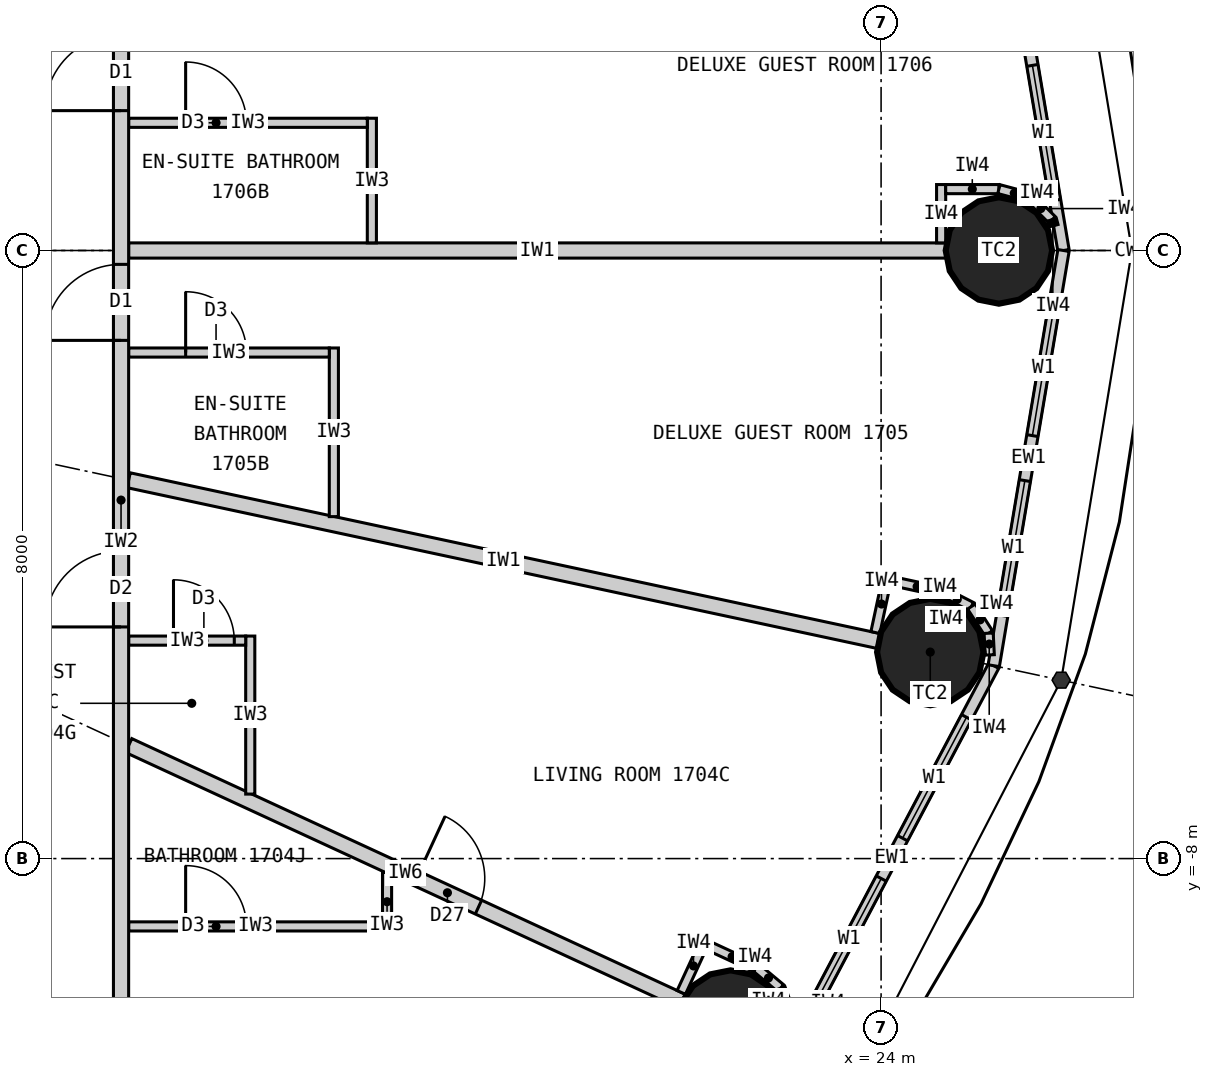
"""IFC4 building model, lengths in metres.
Left out: names, types, materials, properties, quantities, classifications, styles, units other than length and angle.
Written with IfcOpenShell. Run it as: python <this file> out.ifc"""

import sys

from ifc_helpers import new_model, si_unit, direction, frame, frame_2d, origin, origin_2d, place, context, subcontext, project, spatial, rectangle, circle, extrude, element, fill, save


model = new_model("IFC4")
c1 = context("Model", 3, precision=1e-05, world=origin(), true_north=direction((0.0, 1.0)))
c2 = subcontext(c1, "Body", "Model", "MODEL_VIEW")
j1 = project(units=[si_unit("LENGTHUNIT", "METRE"), si_unit("PLANEANGLEUNIT", "RADIAN")], contexts=[c1])
p1 = place(None, origin())
s1 = spatial("IfcSite", under=j1, at=p1, CompositionType="ELEMENT")
p2 = place(p1, origin())
s2 = spatial("IfcBuilding", under=s1, at=p2, CompositionType="ELEMENT")
p3 = place(p2, frame((0.0, 0.0, 70.5)))
s3 = spatial("IfcBuildingStorey", under=s2, at=p3, CompositionType="ELEMENT", Elevation=70.5)
for number, where, z_axis, x_axis in (
    (1, (25.55, 0.0, 0.0), (0.0, 0.0, 1.0), (1.0, 0.0, 0.0)),
    (2, (22.019, -10.17, 0.0), (0.0, 0.0, 1.0), (1.0, 0.0, 0.0)),
    (3, (24.647, -5.283, 0.0), (0.0, 0.0, 1.0), (1.0, 0.0, 0.0)),
):
    element("IfcColumn", number, at=place(p3, frame(where, z_axis=z_axis, x_axis=x_axis)), inside=s3, PredefinedType="COLUMN", context=c2, shape_type="SweptSolid", body=[
        extrude(circle(Radius=0.7, at=origin_2d()), origin(), (0.0, 0.0, 1.0), 3.3),
    ])
p4 = place(p3, frame((26.4, 0.0, 0.0), z_axis=(0.0, 0.0, 1.0), x_axis=(-0.165642551694, 0.986185857264, 0.0)))
e4 = element("IfcWall", 4, at=p4, inside=s3, PredefinedType="ELEMENTEDWALL", context=c2, shape_type="SweptSolid", body=[
    extrude(rectangle(XDim=5.539, YDim=0.15, at=frame_2d((2.77, 0.0))), origin(), (0.0, 0.0, 1.0), 3.12),
])
p5 = place(p4, frame((0.669, 0.0, 0.9)))
e5 = element("IfcOpeningElement", 5, at=p5, cuts=e4, PredefinedType="OPENING", context=c2, shape_type="SweptSolid", body=[
    extrude(rectangle(XDim=1.8, YDim=1.9, at=frame_2d((0.9, 0.95))), frame((0.0, 0.085, 0.0), z_axis=(0.0, -1.0, 0.0), x_axis=(1.0, 0.0, 0.0)), (0.0, 0.0, 1.0), 0.17),
])
p6 = place(p4, frame((3.07, 0.0, 0.9)))
e6 = element("IfcOpeningElement", 6, at=p6, cuts=e4, PredefinedType="OPENING", context=c2, shape_type="SweptSolid", body=[
    extrude(rectangle(XDim=1.8, YDim=1.9, at=frame_2d((0.9, 0.95))), frame((0.0, 0.085, 0.0), z_axis=(0.0, -1.0, 0.0), x_axis=(1.0, 0.0, 0.0)), (0.0, 0.0, 1.0), 0.17),
])
p7 = place(p3, frame((22.803, -10.532, 0.0), z_axis=(0.0, 0.0, 1.0), x_axis=(0.467296867008, 0.884100468321, 0.0)))
e7 = element("IfcWall", 7, at=p7, inside=s3, PredefinedType="ELEMENTEDWALL", context=c2, shape_type="SweptSolid", body=[
    extrude(rectangle(XDim=5.734, YDim=0.15, at=frame_2d((2.867, 0.0))), origin(), (0.0, 0.0, 1.0), 3.12),
])
p8 = place(p7, frame((0.767, 0.0, 0.9)))
e8 = element("IfcOpeningElement", 8, at=p8, cuts=e7, PredefinedType="OPENING", context=c2, shape_type="SweptSolid", body=[
    extrude(rectangle(XDim=1.8, YDim=1.9, at=frame_2d((0.9, 0.95))), frame((0.0, 0.085, 0.0), z_axis=(0.0, -1.0, 0.0), x_axis=(1.0, 0.0, 0.0)), (0.0, 0.0, 1.0), 0.17),
])
p9 = place(p7, frame((3.167, 0.0, 0.9)))
e9 = element("IfcOpeningElement", 9, at=p9, cuts=e7, PredefinedType="OPENING", context=c2, shape_type="SweptSolid", body=[
    extrude(rectangle(XDim=1.8, YDim=1.9, at=frame_2d((0.9, 0.95))), frame((0.0, 0.085, 0.0), z_axis=(0.0, -1.0, 0.0), x_axis=(1.0, 0.0, 0.0)), (0.0, 0.0, 1.0), 0.17),
])
p10 = place(p3, frame((25.482, -5.462, 0.0), z_axis=(0.0, 0.0, 1.0), x_axis=(0.165642551694, 0.986185857264, 0.0)))
e10 = element("IfcWall", 10, at=p10, inside=s3, PredefinedType="ELEMENTEDWALL", context=c2, shape_type="SweptSolid", body=[
    extrude(rectangle(XDim=5.539, YDim=0.15, at=frame_2d((2.77, 0.0))), origin(), (0.0, 0.0, 1.0), 3.12),
])
p11 = place(p10, frame((0.669, 0.0, 0.9)))
e11 = element("IfcOpeningElement", 11, at=p11, cuts=e10, PredefinedType="OPENING", context=c2, shape_type="SweptSolid", body=[
    extrude(rectangle(XDim=1.8, YDim=1.9, at=frame_2d((0.9, 0.95))), frame((0.0, 0.085, 0.0), z_axis=(0.0, -1.0, 0.0), x_axis=(1.0, 0.0, 0.0)), (0.0, 0.0, 1.0), 0.17),
])
p12 = place(p10, frame((3.07, 0.0, 0.9)))
e12 = element("IfcOpeningElement", 12, at=p12, cuts=e10, PredefinedType="OPENING", context=c2, shape_type="SweptSolid", body=[
    extrude(rectangle(XDim=1.8, YDim=1.9, at=frame_2d((0.9, 0.95))), frame((0.0, 0.085, 0.0), z_axis=(0.0, -1.0, 0.0), x_axis=(1.0, 0.0, 0.0)), (0.0, 0.0, 1.0), 0.17),
])
p13 = place(p3, frame((14.1, 0.0, 0.0), z_axis=(0.0, 0.0, 1.0), x_axis=(1.0, 0.0, 0.0)))
e13 = element("IfcWall", 13, at=p13, inside=s3, PredefinedType="PARTITIONING", context=c2, shape_type="SweptSolid", body=[
    extrude(rectangle(XDim=10.75, YDim=0.2, at=frame_2d((5.375, 0.0))), origin(), (0.0, 0.0, 1.0), 2.27),
])
p14 = place(p3, frame((14.1, -6.512, 0.0), z_axis=(0.0, 0.0, 1.0), x_axis=(0.907832871056, -0.419332181247, 0.0)))
e14 = element("IfcWall", 14, at=p14, inside=s3, PredefinedType="PARTITIONING", context=c2, shape_type="SweptSolid", body=[
    extrude(rectangle(XDim=8.023, YDim=0.2, at=frame_2d((4.011, 0.0))), origin(), (0.0, 0.0, 1.0), 2.32),
])
p15 = place(p14, frame((4.17, 0.0, 0.0)))
e15 = element("IfcOpeningElement", 15, at=p15, cuts=e14, PredefinedType="OPENING", context=c2, shape_type="SweptSolid", body=[
    extrude(rectangle(XDim=0.9, YDim=2.1, at=frame_2d((0.45, 1.05))), frame((0.0, 0.11, 0.0), z_axis=(0.0, -1.0, 0.0), x_axis=(1.0, 0.0, 0.0)), (0.0, 0.0, 1.0), 0.22),
])
p16 = place(p3, frame((14.1, -3.022, 0.0), z_axis=(0.0, 0.0, 1.0), x_axis=(0.977790014929, -0.209586943072, 0.0)))
e16 = element("IfcWall", 16, at=p16, inside=s3, PredefinedType="PARTITIONING", context=c2, shape_type="SweptSolid", body=[
    extrude(rectangle(XDim=10.087, YDim=0.2, at=frame_2d((5.043, 0.0))), origin(), (0.0, 0.0, 1.0), 2.32),
])
p17 = place(p3, frame((17.5, -8.183, 0.0), z_axis=(0.0, 0.0, 1.0), x_axis=(0.0, -1.0, 0.0)))
e17 = element("IfcWall", 17, at=p17, inside=s3, PredefinedType="PARTITIONING", context=c2, shape_type="SweptSolid", body=[
    extrude(rectangle(XDim=0.77, YDim=0.12, at=frame_2d((0.385, 0.0))), origin(), (0.0, 0.0, 1.0), 3.12),
])
p18 = place(p3, frame((14.1, -8.893, 0.0), z_axis=(0.0, 0.0, 1.0), x_axis=(1.0, 0.0, 0.0)))
e18 = element("IfcWall", 18, at=p18, inside=s3, PredefinedType="PARTITIONING", context=c2, shape_type="SweptSolid", body=[
    extrude(rectangle(XDim=3.34, YDim=0.12, at=frame_2d((1.67, 0.0))), origin(), (0.0, 0.0, 1.0), 3.12),
])
p19 = place(p18, frame((0.75, 0.0, 0.0)))
e19 = element("IfcOpeningElement", 19, at=p19, cuts=e18, PredefinedType="OPENING", context=c2, shape_type="SweptSolid", body=[
    extrude(rectangle(XDim=0.8, YDim=2.1, at=frame_2d((0.4, 1.05))), frame((0.0, 0.07, 0.0), z_axis=(0.0, -1.0, 0.0), x_axis=(1.0, 0.0, 0.0)), (0.0, 0.0, 1.0), 0.14),
])
p20 = place(p3, frame((15.7, -7.152, 0.0), z_axis=(0.0, 0.0, 1.0), x_axis=(0.0, 1.0, 0.0)))
e20 = element("IfcWall", 20, at=p20, inside=s3, PredefinedType="PARTITIONING", context=c2, shape_type="SweptSolid", body=[
    extrude(rectangle(XDim=2.079, YDim=0.12, at=frame_2d((1.04, 0.0))), origin(), (0.0, 0.0, 1.0), 3.12),
])
p21 = place(p3, frame((14.1, -5.133, 0.0), z_axis=(0.0, 0.0, 1.0), x_axis=(1.0, 0.0, 0.0)))
e21 = element("IfcWall", 21, at=p21, inside=s3, PredefinedType="PARTITIONING", context=c2, shape_type="SweptSolid", body=[
    extrude(rectangle(XDim=1.54, YDim=0.12, at=frame_2d((0.77, 0.0))), origin(), (0.0, 0.0, 1.0), 3.12),
])
p22 = place(p21, frame((0.59, 0.0, 0.0)))
e22 = element("IfcOpeningElement", 22, at=p22, cuts=e21, PredefinedType="OPENING", context=c2, shape_type="SweptSolid", body=[
    extrude(rectangle(XDim=0.8, YDim=2.1, at=frame_2d((0.4, 1.05))), frame((0.0, 0.07, 0.0), z_axis=(0.0, -1.0, 0.0), x_axis=(1.0, 0.0, 0.0)), (0.0, 0.0, 1.0), 0.14),
])
p23 = place(p3, frame((16.8, -3.501, 0.0), z_axis=(0.0, 0.0, 1.0), x_axis=(0.0, 1.0, 0.0)))
e23 = element("IfcWall", 23, at=p23, inside=s3, PredefinedType="PARTITIONING", context=c2, shape_type="SweptSolid", body=[
    extrude(rectangle(XDim=2.219, YDim=0.12, at=frame_2d((1.109, 0.0))), origin(), (0.0, 0.0, 1.0), 3.12),
])
p24 = place(p3, frame((14.1, -1.343, 0.0), z_axis=(0.0, 0.0, 1.0), x_axis=(1.0, 0.0, 0.0)))
e24 = element("IfcWall", 24, at=p24, inside=s3, PredefinedType="PARTITIONING", context=c2, shape_type="SweptSolid", body=[
    extrude(rectangle(XDim=2.64, YDim=0.12, at=frame_2d((1.32, 0.0))), origin(), (0.0, 0.0, 1.0), 3.12),
])
p25 = place(p24, frame((0.75, 0.0, 0.0)))
e25 = element("IfcOpeningElement", 25, at=p25, cuts=e24, PredefinedType="OPENING", context=c2, shape_type="SweptSolid", body=[
    extrude(rectangle(XDim=0.8, YDim=2.1, at=frame_2d((0.4, 1.05))), frame((0.0, 0.07, 0.0), z_axis=(0.0, -1.0, 0.0), x_axis=(1.0, 0.0, 0.0)), (0.0, 0.0, 1.0), 0.14),
])
p26 = place(p3, frame((17.3, 0.1, 0.0), z_axis=(0.0, 0.0, 1.0), x_axis=(0.0, 1.0, 0.0)))
e26 = element("IfcWall", 26, at=p26, inside=s3, PredefinedType="PARTITIONING", context=c2, shape_type="SweptSolid", body=[
    extrude(rectangle(XDim=1.64, YDim=0.12, at=frame_2d((0.82, 0.0))), origin(), (0.0, 0.0, 1.0), 3.12),
])
p27 = place(p3, frame((14.1, 1.68, 0.0), z_axis=(0.0, 0.0, 1.0), x_axis=(1.0, 0.0, 0.0)))
e27 = element("IfcWall", 27, at=p27, inside=s3, PredefinedType="PARTITIONING", context=c2, shape_type="SweptSolid", body=[
    extrude(rectangle(XDim=3.14, YDim=0.12, at=frame_2d((1.57, 0.0))), origin(), (0.0, 0.0, 1.0), 3.12),
])
p28 = place(p27, frame((0.75, 0.0, 0.0)))
e28 = element("IfcOpeningElement", 28, at=p28, cuts=e27, PredefinedType="OPENING", context=c2, shape_type="SweptSolid", body=[
    extrude(rectangle(XDim=0.8, YDim=2.1, at=frame_2d((0.4, 1.05))), frame((0.0, 0.07, 0.0), z_axis=(0.0, -1.0, 0.0), x_axis=(1.0, 0.0, 0.0)), (0.0, 0.0, 1.0), 0.14),
])
p29 = place(p3, frame((14.0, -9.9, 0.0), z_axis=(0.0, 0.0, 1.0), x_axis=(0.0, 1.0, 0.0)))
e29 = element("IfcWall", 29, at=p29, inside=s3, PredefinedType="PARTITIONING", context=c2, shape_type="SweptSolid", body=[
    extrude(rectangle(XDim=13.232, YDim=0.2, at=frame_2d((6.616, 0.0))), origin(), (0.0, 0.0, 1.0), 3.12),
])
p30 = place(p29, frame((4.948, 0.0, 0.0)))
e30 = element("IfcOpeningElement", 30, at=p30, cuts=e29, PredefinedType="OPENING", context=c2, shape_type="SweptSolid", body=[
    extrude(rectangle(XDim=1.0, YDim=2.2, at=frame_2d((0.5, 1.1))), frame((0.0, 0.11, 0.0), z_axis=(0.0, -1.0, 0.0), x_axis=(1.0, 0.0, 0.0)), (0.0, 0.0, 1.0), 0.22),
])
p31 = place(p29, frame((8.718, 0.0, 0.0)))
e31 = element("IfcOpeningElement", 31, at=p31, cuts=e29, PredefinedType="OPENING", context=c2, shape_type="SweptSolid", body=[
    extrude(rectangle(XDim=1.0, YDim=2.2, at=frame_2d((0.5, 1.1))), frame((0.0, 0.11, 0.0), z_axis=(0.0, -1.0, 0.0), x_axis=(1.0, 0.0, 0.0)), (0.0, 0.0, 1.0), 0.22),
])
p32 = place(p29, frame((11.74, 0.0, 0.0)))
e32 = element("IfcOpeningElement", 32, at=p32, cuts=e29, PredefinedType="OPENING", context=c2, shape_type="SweptSolid", body=[
    extrude(rectangle(XDim=1.0, YDim=2.2, at=frame_2d((0.5, 1.1))), frame((0.0, 0.11, 0.0), z_axis=(0.0, -1.0, 0.0), x_axis=(1.0, 0.0, 0.0)), (0.0, 0.0, 1.0), 0.22),
])
p33 = place(p3, frame((24.79, 0.1, 0.0), z_axis=(0.0, 0.0, 1.0), x_axis=(0.0, 1.0, 0.0)))
e33 = element("IfcWall", 33, at=p33, inside=s3, PredefinedType="PARTITIONING", context=c2, shape_type="SweptSolid", body=[
    extrude(rectangle(XDim=0.767, YDim=0.12, at=frame_2d((0.384, 0.0))), origin(), (0.0, 0.0, 1.0), 3.12),
])
p34 = place(p3, frame((24.85, 0.808, 0.0), z_axis=(0.0, 0.0, 1.0), x_axis=(1.0, 0.0, 0.0)))
e34 = element("IfcWall", 34, at=p34, inside=s3, PredefinedType="PARTITIONING", context=c2, shape_type="SweptSolid", body=[
    extrude(rectangle(XDim=0.7, YDim=0.12, at=frame_2d((0.35, 0.0))), origin(), (0.0, 0.0, 1.0), 3.12),
])
p35 = place(p3, frame((25.55, 0.808, 0.0), z_axis=(0.0, 0.0, 1.0), x_axis=(0.965807183573, -0.2592614205, 0.0)))
e35 = element("IfcWall", 35, at=p35, inside=s3, PredefinedType="PARTITIONING", context=c2, shape_type="SweptSolid", body=[
    extrude(rectangle(XDim=0.418, YDim=0.12, at=frame_2d((0.209, 0.0))), origin(), (0.0, 0.0, 1.0), 3.12),
])
p36 = place(p3, frame((25.954, 0.699, 0.0), z_axis=(0.0, 0.0, 1.0), x_axis=(0.707106781187, -0.707106781187, 0.0)))
e36 = element("IfcWall", 36, at=p36, inside=s3, PredefinedType="PARTITIONING", context=c2, shape_type="SweptSolid", body=[
    extrude(rectangle(XDim=0.418, YDim=0.12, at=frame_2d((0.209, 0.0))), origin(), (0.0, 0.0, 1.0), 3.12),
])
p37 = place(p3, frame((26.249, 0.404, 0.0), z_axis=(0.0, 0.0, 1.0), x_axis=(0.259754282609, -0.965674744759, 0.0)))
e37 = element("IfcWall", 37, at=p37, inside=s3, PredefinedType="PARTITIONING", context=c2, shape_type="SweptSolid", body=[
    extrude(rectangle(XDim=0.08, YDim=0.12, at=frame_2d((0.04, 0.0))), origin(), (0.0, 0.0, 1.0), 3.12),
])
p38 = place(p3, frame((21.371, -9.761, 0.0), z_axis=(0.0, 0.0, 1.0), x_axis=(0.419259891039, 0.907866258744, 0.0)))
e38 = element("IfcWall", 38, at=p38, inside=s3, PredefinedType="PARTITIONING", context=c2, shape_type="SweptSolid", body=[
    extrude(rectangle(XDim=0.768, YDim=0.12, at=frame_2d((0.384, 0.0))), origin(), (0.0, 0.0, 1.0), 3.12),
])
p39 = place(p3, frame((21.722, -9.144, 0.0), z_axis=(0.0, 0.0, 1.0), x_axis=(0.907877701396, -0.419235112208, 0.0)))
e39 = element("IfcWall", 39, at=p39, inside=s3, PredefinedType="PARTITIONING", context=c2, shape_type="SweptSolid", body=[
    extrude(rectangle(XDim=0.7, YDim=0.12, at=frame_2d((0.35, 0.0))), origin(), (0.0, 0.0, 1.0), 3.12),
])
p40 = place(p3, frame((22.358, -9.437, 0.0), z_axis=(0.0, 0.0, 1.0), x_axis=(0.768412687942, -0.639954639806, 0.0)))
e40 = element("IfcWall", 40, at=p40, inside=s3, PredefinedType="PARTITIONING", context=c2, shape_type="SweptSolid", body=[
    extrude(rectangle(XDim=0.418, YDim=0.12, at=frame_2d((0.209, 0.0))), origin(), (0.0, 0.0, 1.0), 3.12),
])
p41 = place(p3, frame((22.679, -9.705, 0.0), z_axis=(0.0, 0.0, 1.0), x_axis=(0.345164001646, -0.938542386879, 0.0)))
e41 = element("IfcWall", 41, at=p41, inside=s3, PredefinedType="PARTITIONING", context=c2, shape_type="SweptSolid", body=[
    extrude(rectangle(XDim=0.418, YDim=0.12, at=frame_2d((0.209, 0.0))), origin(), (0.0, 0.0, 1.0), 3.12),
])
p42 = place(p3, frame((23.925, -5.026, 0.0), z_axis=(0.0, 0.0, 1.0), x_axis=(0.209681192172, 0.977769808109, 0.0)))
e42 = element("IfcWall", 42, at=p42, inside=s3, PredefinedType="PARTITIONING", context=c2, shape_type="SweptSolid", body=[
    extrude(rectangle(XDim=0.767, YDim=0.12, at=frame_2d((0.384, 0.0))), origin(), (0.0, 0.0, 1.0), 3.12),
])
p43 = place(p3, frame((24.132, -4.347, 0.0), z_axis=(0.0, 0.0, 1.0), x_axis=(0.977776882509, -0.209648200638, 0.0)))
e43 = element("IfcWall", 43, at=p43, inside=s3, PredefinedType="PARTITIONING", context=c2, shape_type="SweptSolid", body=[
    extrude(rectangle(XDim=0.7, YDim=0.12, at=frame_2d((0.35, 0.0))), origin(), (0.0, 0.0, 1.0), 3.12),
])
for number, where, z_axis, x_axis in (
    (44, (24.816, -4.494, 0.0), (0.0, 0.0, 1.0), (0.89, -0.455, 0.0)),
    (45, (25.188, -4.684, 0.0), (0.0, 0.0, 1.0), (0.543, -0.84, 0.0)),
):
    element("IfcWall", number, at=place(p3, frame(where, z_axis=z_axis, x_axis=x_axis)), inside=s3, PredefinedType="PARTITIONING", context=c2, shape_type="SweptSolid", body=[
        extrude(rectangle(XDim=0.418, YDim=0.12, at=frame_2d((0.209, 0.0))), origin(), (0.0, 0.0, 1.0), 3.12),
    ])
p44 = place(p3, frame((25.416, -5.035, 0.0), z_axis=(0.0, 0.0, 1.0), x_axis=(0.050406329159, -0.998728793007, 0.0)))
e46 = element("IfcWall", 46, at=p44, inside=s3, PredefinedType="PARTITIONING", context=c2, shape_type="SweptSolid", body=[
    extrude(rectangle(XDim=0.286, YDim=0.12, at=frame_2d((0.143, 0.0))), origin(), (0.0, 0.0, 1.0), 3.12),
])
p45 = place(p5, origin())
e47 = element("IfcWindow", 47, at=p45, inside=s3, PartitioningType="SINGLE_PANEL", PredefinedType="WINDOW", context=c2, shape_type="SweptSolid", body=[
    extrude(rectangle(XDim=1.8, YDim=1.9, at=frame_2d((0.9, 0.95))), frame((0.0, 0.03, 0.0), z_axis=(0.0, -1.0, 0.0), x_axis=(1.0, 0.0, 0.0)), (0.0, 0.0, 1.0), 0.06),
])
fill(e5, e47)
p46 = place(p8, origin())
e48 = element("IfcWindow", 48, at=p46, inside=s3, PartitioningType="SINGLE_PANEL", PredefinedType="WINDOW", context=c2, shape_type="SweptSolid", body=[
    extrude(rectangle(XDim=1.8, YDim=1.9, at=frame_2d((0.9, 0.95))), frame((0.0, 0.03, 0.0), z_axis=(0.0, -1.0, 0.0), x_axis=(1.0, 0.0, 0.0)), (0.0, 0.0, 1.0), 0.06),
])
fill(e8, e48)
p47 = place(p9, origin())
e49 = element("IfcWindow", 49, at=p47, inside=s3, PartitioningType="SINGLE_PANEL", PredefinedType="WINDOW", context=c2, shape_type="SweptSolid", body=[
    extrude(rectangle(XDim=1.8, YDim=1.9, at=frame_2d((0.9, 0.95))), frame((0.0, 0.03, 0.0), z_axis=(0.0, -1.0, 0.0), x_axis=(1.0, 0.0, 0.0)), (0.0, 0.0, 1.0), 0.06),
])
fill(e9, e49)
p48 = place(p11, origin())
e50 = element("IfcWindow", 50, at=p48, inside=s3, PartitioningType="SINGLE_PANEL", PredefinedType="WINDOW", context=c2, shape_type="SweptSolid", body=[
    extrude(rectangle(XDim=1.8, YDim=1.9, at=frame_2d((0.9, 0.95))), frame((0.0, 0.03, 0.0), z_axis=(0.0, -1.0, 0.0), x_axis=(1.0, 0.0, 0.0)), (0.0, 0.0, 1.0), 0.06),
])
fill(e11, e50)
p49 = place(p12, origin())
e51 = element("IfcWindow", 51, at=p49, inside=s3, PartitioningType="SINGLE_PANEL", PredefinedType="WINDOW", context=c2, shape_type="SweptSolid", body=[
    extrude(rectangle(XDim=1.8, YDim=1.9, at=frame_2d((0.9, 0.95))), frame((0.0, 0.03, 0.0), z_axis=(0.0, -1.0, 0.0), x_axis=(1.0, 0.0, 0.0)), (0.0, 0.0, 1.0), 0.06),
])
fill(e12, e51)
p50 = place(p19, origin())
e52 = element("IfcDoor", 52, at=p50, inside=s3, OperationType="SINGLE_SWING_LEFT", PredefinedType="DOOR", context=c2, shape_type="SweptSolid", body=[
    extrude(rectangle(XDim=0.8, YDim=2.1, at=frame_2d((0.4, 1.05))), frame((0.0, 0.025, 0.0), z_axis=(0.0, -1.0, 0.0), x_axis=(1.0, 0.0, 0.0)), (0.0, 0.0, 1.0), 0.05),
])
fill(e19, e52)
p51 = place(p22, origin())
e53 = element("IfcDoor", 53, at=p51, inside=s3, OperationType="SINGLE_SWING_LEFT", PredefinedType="DOOR", context=c2, shape_type="SweptSolid", body=[
    extrude(rectangle(XDim=0.8, YDim=2.1, at=frame_2d((0.4, 1.05))), frame((0.0, 0.025, 0.0), z_axis=(0.0, -1.0, 0.0), x_axis=(1.0, 0.0, 0.0)), (0.0, 0.0, 1.0), 0.05),
])
fill(e22, e53)
p52 = place(p30, origin())
e54 = element("IfcDoor", 54, at=p52, inside=s3, OperationType="SINGLE_SWING_LEFT", PredefinedType="DOOR", context=c2, shape_type="SweptSolid", body=[
    extrude(rectangle(XDim=1.0, YDim=2.2, at=frame_2d((0.5, 1.1))), frame((0.0, 0.025, 0.0), z_axis=(0.0, -1.0, 0.0), x_axis=(1.0, 0.0, 0.0)), (0.0, 0.0, 1.0), 0.05),
])
fill(e30, e54)
p53 = place(p15, origin())
e55 = element("IfcDoor", 55, at=p53, inside=s3, OperationType="SINGLE_SWING_LEFT", PredefinedType="DOOR", context=c2, shape_type="SweptSolid", body=[
    extrude(rectangle(XDim=0.9, YDim=2.1, at=frame_2d((0.45, 1.05))), frame((0.0, 0.025, 0.0), z_axis=(0.0, -1.0, 0.0), x_axis=(1.0, 0.0, 0.0)), (0.0, 0.0, 1.0), 0.05),
])
fill(e15, e55)
p54 = place(p25, origin())
e56 = element("IfcDoor", 56, at=p54, inside=s3, OperationType="SINGLE_SWING_LEFT", PredefinedType="DOOR", context=c2, shape_type="SweptSolid", body=[
    extrude(rectangle(XDim=0.8, YDim=2.1, at=frame_2d((0.4, 1.05))), frame((0.0, 0.025, 0.0), z_axis=(0.0, -1.0, 0.0), x_axis=(1.0, 0.0, 0.0)), (0.0, 0.0, 1.0), 0.05),
])
fill(e25, e56)
p55 = place(p31, origin())
e57 = element("IfcDoor", 57, at=p55, inside=s3, OperationType="SINGLE_SWING_LEFT", PredefinedType="DOOR", context=c2, shape_type="SweptSolid", body=[
    extrude(rectangle(XDim=1.0, YDim=2.2, at=frame_2d((0.5, 1.1))), frame((0.0, 0.025, 0.0), z_axis=(0.0, -1.0, 0.0), x_axis=(1.0, 0.0, 0.0)), (0.0, 0.0, 1.0), 0.05),
])
fill(e31, e57)
p56 = place(p28, origin())
e58 = element("IfcDoor", 58, at=p56, inside=s3, OperationType="SINGLE_SWING_LEFT", PredefinedType="DOOR", context=c2, shape_type="SweptSolid", body=[
    extrude(rectangle(XDim=0.8, YDim=2.1, at=frame_2d((0.4, 1.05))), frame((0.0, 0.025, 0.0), z_axis=(0.0, -1.0, 0.0), x_axis=(1.0, 0.0, 0.0)), (0.0, 0.0, 1.0), 0.05),
])
fill(e28, e58)
p57 = place(p32, origin())
e59 = element("IfcDoor", 59, at=p57, inside=s3, OperationType="SINGLE_SWING_LEFT", PredefinedType="DOOR", context=c2, shape_type="SweptSolid", body=[
    extrude(rectangle(XDim=1.0, YDim=2.2, at=frame_2d((0.5, 1.1))), frame((0.0, 0.025, 0.0), z_axis=(0.0, -1.0, 0.0), x_axis=(1.0, 0.0, 0.0)), (0.0, 0.0, 1.0), 0.05),
])
fill(e32, e59)
save(model, sys.argv[1])
